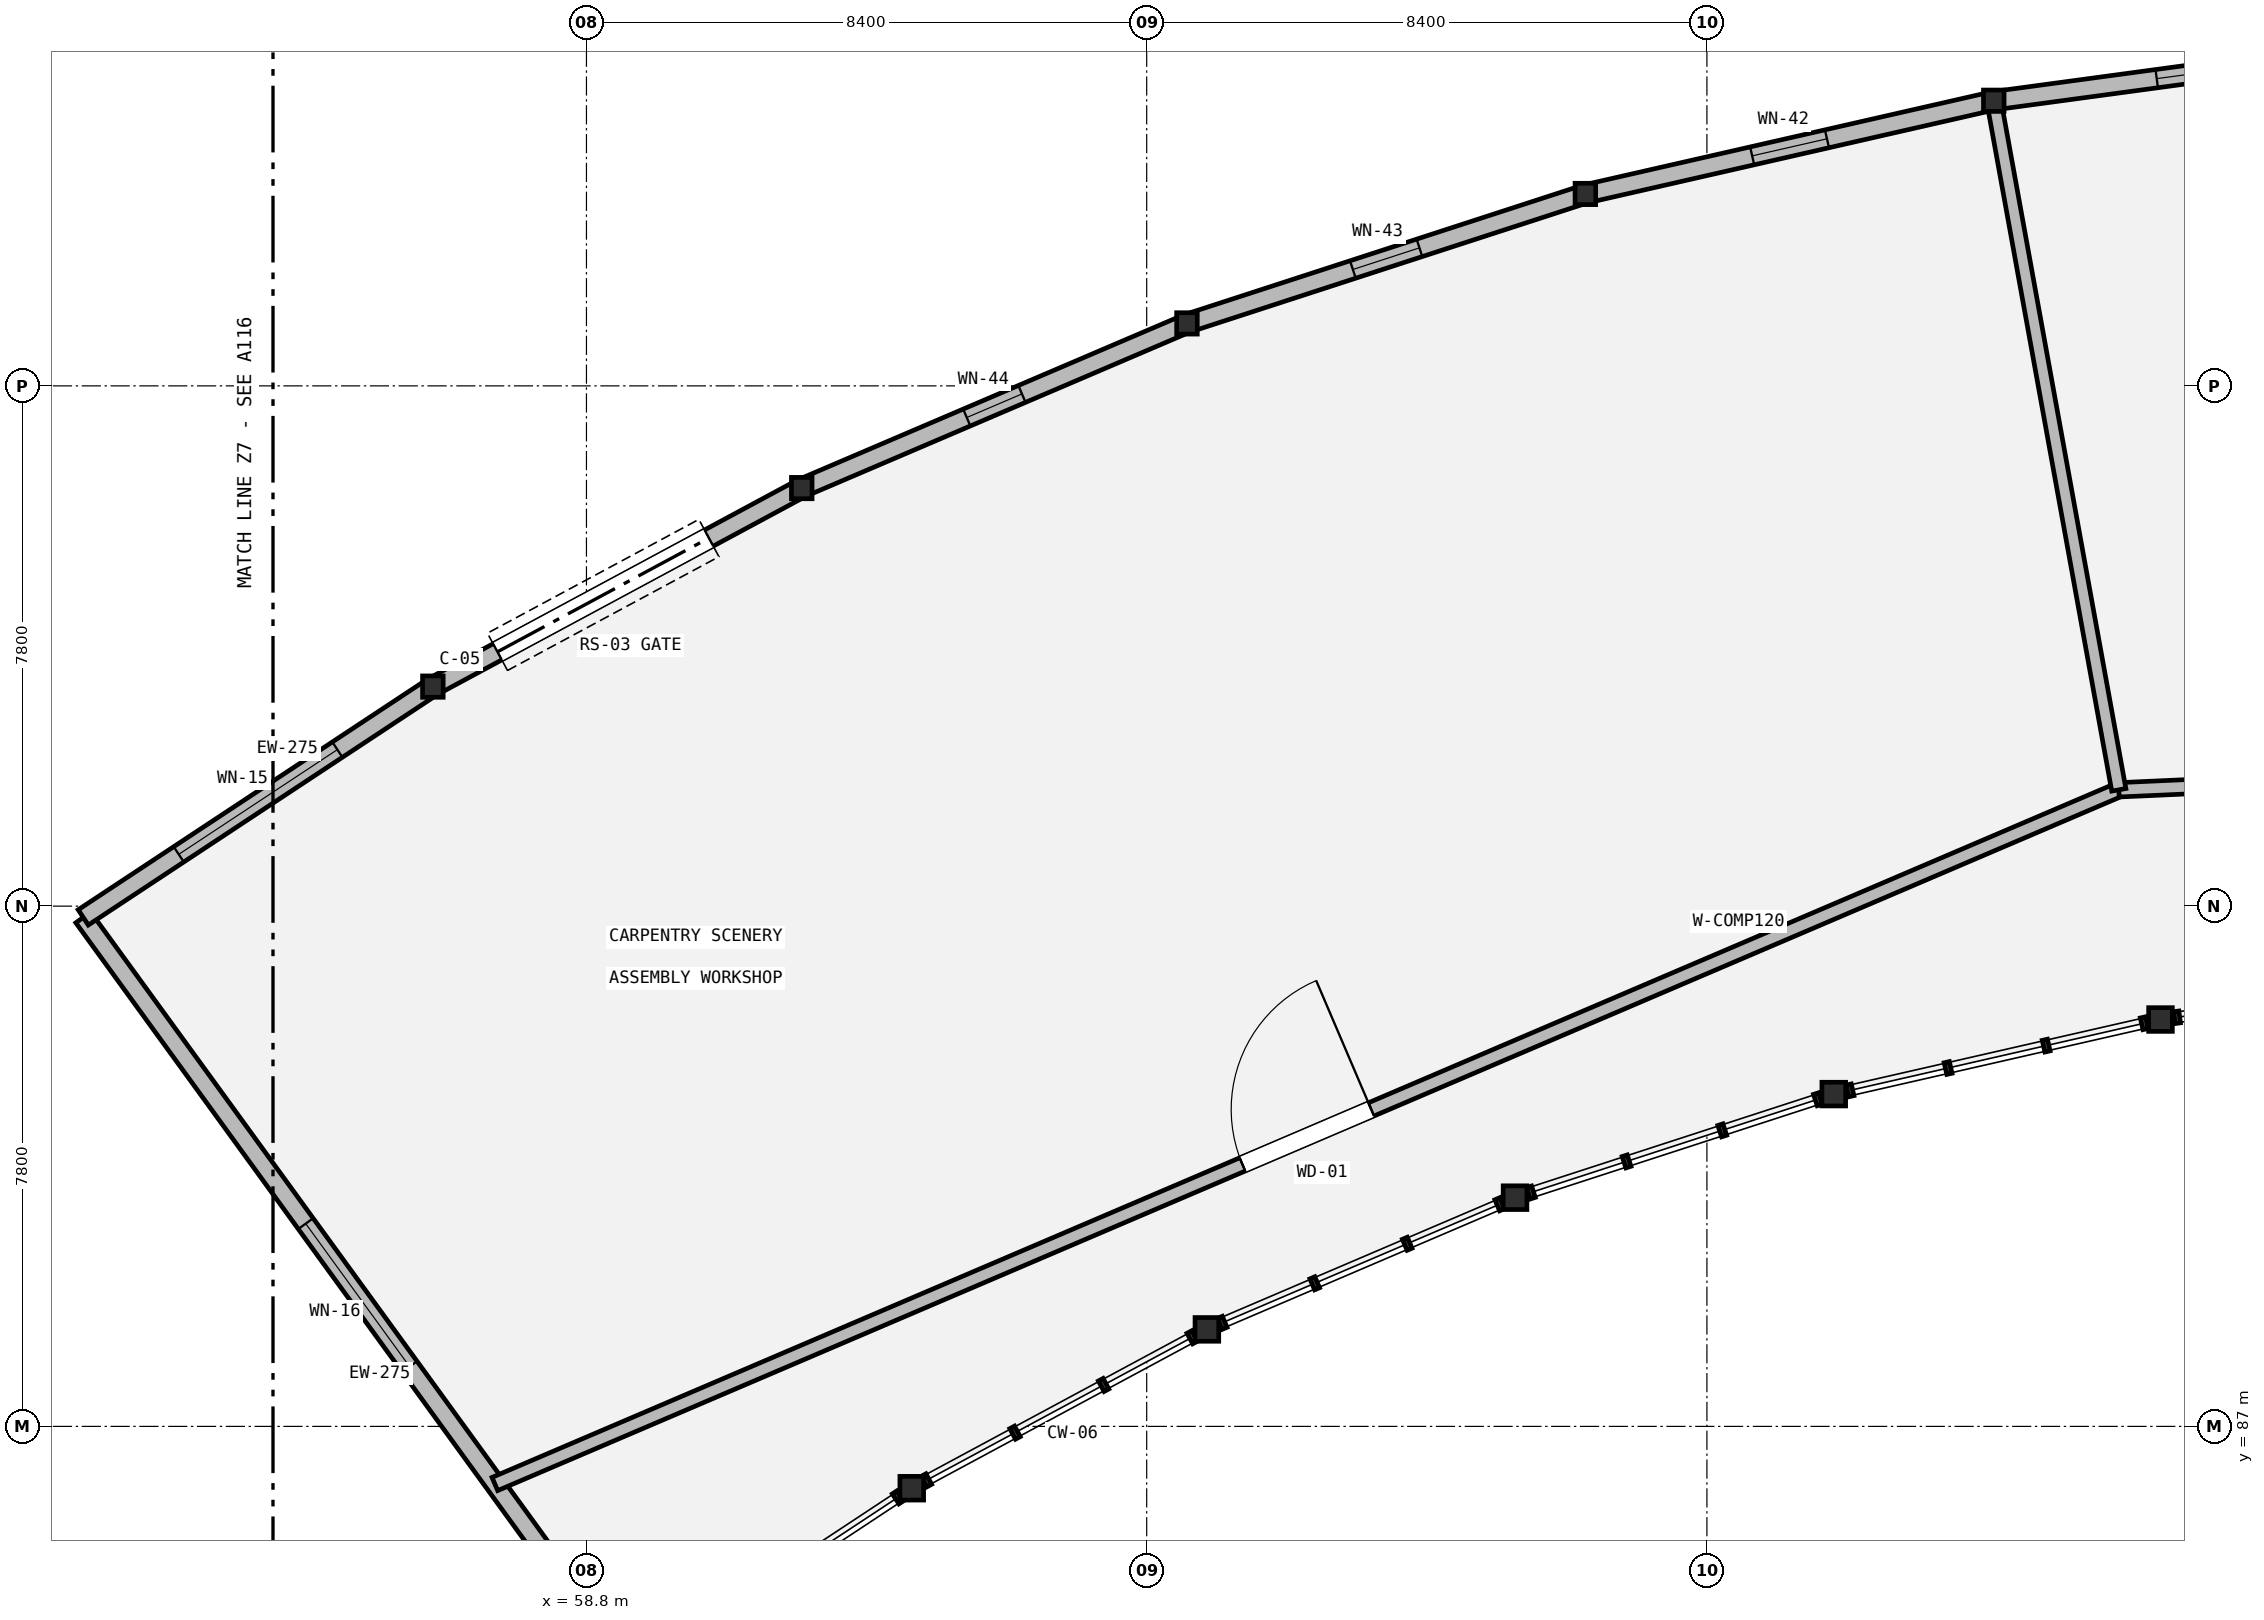
"""IFC4 building model, lengths in metres.
Left out: names, types, materials, properties, quantities, classifications, styles, units other than length and angle.
Written with IfcOpenShell. Run it as: python <this file> out.ifc"""

import sys

from ifc_helpers import new_model, si_unit, direction, frame, frame_2d, origin, origin_2d, place, context, subcontext, project, spatial, rectangle, hollow_circle, i_section, extrude, element, fill, save


model = new_model("IFC4")
c1 = context("Model", 3, precision=1e-05, world=origin(), true_north=direction((0.0, 1.0)))
c2 = subcontext(c1, "Body", "Model", "MODEL_VIEW")
j1 = project(units=[si_unit("LENGTHUNIT", "METRE"), si_unit("PLANEANGLEUNIT", "RADIAN")], contexts=[c1])
p1 = place(None, origin())
s1 = spatial("IfcSite", under=j1, at=p1, CompositionType="ELEMENT")
p2 = place(p1, origin())
s2 = spatial("IfcBuilding", under=s1, at=p2, CompositionType="ELEMENT")
p3 = place(p2, origin())
s3 = spatial("IfcBuildingStorey", under=s2, at=p3, CompositionType="ELEMENT", Elevation=0.0)
p4 = place(p3, frame((51.255, 94.631, 0.0), z_axis=(0.0, 0.0, 1.0), x_axis=(1.0, 0.0, 0.0)))
e1 = element("IfcColumn", 1, at=p4, inside=s3, PredefinedType="COLUMN", context=c2, shape_type="SweptSolid", body=[
    extrude(i_section(OverallWidth=0.309, OverallDepth=0.321, WebThickness=0.014, FlangeThickness=0.022, FilletRadius=0.015, at=origin_2d()), origin(), (0.0, 0.0, 1.0), 5.4),
])
p5 = place(p3, frame((63.677, 86.073, 0.0), z_axis=(0.0, 0.0, 1.0), x_axis=(1.0, 0.0, 0.0)))
e2 = element("IfcColumn", 2, at=p5, inside=s3, PredefinedType="COLUMN", context=c2, shape_type="SweptSolid", body=[
    extrude(hollow_circle(Radius=0.178, WallThickness=0.016, at=origin_2d()), origin(), (0.0, 0.0, 1.0), 5.4),
])
p6 = place(p3, frame((56.497, 98.091, 0.0), z_axis=(0.0, 0.0, 1.0), x_axis=(1.0, 0.0, 0.0)))
e3 = element("IfcColumn", 3, at=p6, inside=s3, PredefinedType="COLUMN", context=c2, shape_type="SweptSolid", body=[
    extrude(i_section(OverallWidth=0.309, OverallDepth=0.321, WebThickness=0.014, FlangeThickness=0.022, FilletRadius=0.015, at=origin_2d()), origin(), (0.0, 0.0, 1.0), 5.4),
])
p7 = place(p3, frame((68.103, 88.454, 0.0), z_axis=(0.0, 0.0, 1.0), x_axis=(1.0, 0.0, 0.0)))
e4 = element("IfcColumn", 4, at=p7, inside=s3, PredefinedType="COLUMN", context=c2, shape_type="SweptSolid", body=[
    extrude(hollow_circle(Radius=0.178, WallThickness=0.016, at=origin_2d()), origin(), (0.0, 0.0, 1.0), 5.4),
])
p8 = place(p3, frame((62.028, 101.068, 0.0), z_axis=(0.0, 0.0, 1.0), x_axis=(1.0, 0.0, 0.0)))
e5 = element("IfcColumn", 5, at=p8, inside=s3, PredefinedType="COLUMN", context=c2, shape_type="SweptSolid", body=[
    extrude(i_section(OverallWidth=0.309, OverallDepth=0.321, WebThickness=0.014, FlangeThickness=0.022, FilletRadius=0.015, at=origin_2d()), origin(), (0.0, 0.0, 1.0), 5.4),
])
p9 = place(p3, frame((72.723, 90.429, 0.0), z_axis=(0.0, 0.0, 1.0), x_axis=(1.0, 0.0, 0.0)))
e6 = element("IfcColumn", 6, at=p9, inside=s3, PredefinedType="COLUMN", context=c2, shape_type="SweptSolid", body=[
    extrude(hollow_circle(Radius=0.178, WallThickness=0.016, at=origin_2d()), origin(), (0.0, 0.0, 1.0), 5.4),
])
p10 = place(p3, frame((67.804, 103.536, 0.0), z_axis=(0.0, 0.0, 1.0), x_axis=(1.0, 0.0, 0.0)))
e7 = element("IfcColumn", 7, at=p10, inside=s3, PredefinedType="COLUMN", context=c2, shape_type="SweptSolid", body=[
    extrude(i_section(OverallWidth=0.309, OverallDepth=0.321, WebThickness=0.014, FlangeThickness=0.022, FilletRadius=0.015, at=origin_2d()), origin(), (0.0, 0.0, 1.0), 5.4),
])
p11 = place(p3, frame((77.502, 91.982, 0.0), z_axis=(0.0, 0.0, 1.0), x_axis=(1.0, 0.0, 0.0)))
e8 = element("IfcColumn", 8, at=p11, inside=s3, PredefinedType="COLUMN", context=c2, shape_type="SweptSolid", body=[
    extrude(hollow_circle(Radius=0.178, WallThickness=0.016, at=origin_2d()), origin(), (0.0, 0.0, 1.0), 5.4),
])
p12 = place(p3, frame((73.777, 105.477, 0.0), z_axis=(0.0, 0.0, 1.0), x_axis=(1.0, 0.0, 0.0)))
e9 = element("IfcColumn", 9, at=p12, inside=s3, PredefinedType="COLUMN", context=c2, shape_type="SweptSolid", body=[
    extrude(i_section(OverallWidth=0.309, OverallDepth=0.321, WebThickness=0.014, FlangeThickness=0.022, FilletRadius=0.015, at=origin_2d()), origin(), (0.0, 0.0, 1.0), 5.4),
])
p13 = place(p3, frame((82.401, 93.1, 0.0), z_axis=(0.0, 0.0, 1.0), x_axis=(1.0, 0.0, 0.0)))
e10 = element("IfcColumn", 10, at=p13, inside=s3, PredefinedType="COLUMN", context=c2, shape_type="SweptSolid", body=[
    extrude(hollow_circle(Radius=0.178, WallThickness=0.016, at=origin_2d()), origin(), (0.0, 0.0, 1.0), 5.4),
])
p14 = place(p3, frame((79.901, 106.875, 0.0), z_axis=(0.0, 0.0, 1.0), x_axis=(1.0, 0.0, 0.0)))
e11 = element("IfcColumn", 11, at=p14, inside=s3, PredefinedType="COLUMN", context=c2, shape_type="SweptSolid", body=[
    extrude(i_section(OverallWidth=0.309, OverallDepth=0.321, WebThickness=0.014, FlangeThickness=0.022, FilletRadius=0.015, at=origin_2d()), origin(), (0.0, 0.0, 1.0), 5.4),
])
p15 = place(p3, frame((59.484, 83.305, 0.0), z_axis=(0.0, 0.0, 1.0), x_axis=(-0.587787980643, 0.809015012105, 0.0)))
e12 = element("IfcWall", 12, at=p15, inside=s3, PredefinedType="STANDARD", context=c2, shape_type="SweptSolid", body=[
    extrude(rectangle(XDim=14.0, YDim=0.275, at=frame_2d((7.0, 0.0))), origin(), (0.0, 0.0, 1.0), 4.639),
])
p16 = place(p15, frame((5.675, 0.0, 0.9)))
e13 = element("IfcOpeningElement", 13, at=p16, cuts=e12, PredefinedType="OPENING", context=c2, shape_type="SweptSolid", body=[
    extrude(rectangle(XDim=2.65, YDim=2.1, at=frame_2d((1.325, 1.05))), frame((0.0, 0.147, 0.0), z_axis=(0.0, -1.0, 0.0), x_axis=(1.0, 0.0, 0.0)), (0.0, 0.0, 1.0), 0.295),
])
p17 = place(p3, frame((51.255, 94.631, 0.0), z_axis=(0.0, 0.0, 1.0), x_axis=(0.834582959038, 0.550882278244, 0.0)))
e14 = element("IfcWall", 14, at=p17, inside=s3, PredefinedType="STANDARD", context=c2, shape_type="SweptSolid", body=[
    extrude(rectangle(XDim=6.281, YDim=0.275, at=frame_2d((3.141, 0.0))), origin(), (0.0, 0.0, 1.0), 4.639),
])
p18 = place(p17, frame((1.716, 0.0, 0.9)))
e15 = element("IfcOpeningElement", 15, at=p18, cuts=e14, PredefinedType="OPENING", context=c2, shape_type="SweptSolid", body=[
    extrude(rectangle(XDim=2.85, YDim=2.1, at=frame_2d((1.425, 1.05))), frame((0.0, 0.147, 0.0), z_axis=(0.0, -1.0, 0.0), x_axis=(1.0, 0.0, 0.0)), (0.0, 0.0, 1.0), 0.295),
])
p19 = place(p3, frame((56.497, 98.091, 0.0), z_axis=(0.0, 0.0, 1.0), x_axis=(0.880582156138, 0.473893517883, 0.0)))
e16 = element("IfcWall", 16, at=p19, inside=s3, PredefinedType="STANDARD", context=c2, shape_type="SweptSolid", body=[
    extrude(rectangle(XDim=6.281, YDim=0.275, at=frame_2d((3.141, 0.0))), origin(), (0.0, 0.0, 1.0), 4.639),
])
p20 = place(p19, frame((1.1, 0.0, 0.0)))
e17 = element("IfcOpeningElement", 17, at=p20, cuts=e16, PredefinedType="OPENING", context=c2, shape_type="SweptSolid", body=[
    extrude(rectangle(XDim=3.6, YDim=3.5, at=frame_2d((1.8, 1.75))), frame((0.0, 0.147, 0.0), z_axis=(0.0, -1.0, 0.0), x_axis=(1.0, 0.0, 0.0)), (0.0, 0.0, 1.0), 0.295),
])
p21 = place(p3, frame((62.028, 101.068, 0.0), z_axis=(0.0, 0.0, 1.0), x_axis=(0.919534614305, 0.393009024189, 0.0)))
e18 = element("IfcWall", 18, at=p21, inside=s3, PredefinedType="STANDARD", context=c2, shape_type="SweptSolid", body=[
    extrude(rectangle(XDim=6.281, YDim=0.275, at=frame_2d((3.141, 0.0))), origin(), (0.0, 0.0, 1.0), 4.639),
])
p22 = place(p21, frame((2.691, 0.0, 0.9)))
e19 = element("IfcOpeningElement", 19, at=p22, cuts=e18, PredefinedType="OPENING", context=c2, shape_type="SweptSolid", body=[
    extrude(rectangle(XDim=0.9, YDim=1.35, at=frame_2d((0.45, 0.675))), frame((0.0, 0.147, 0.0), z_axis=(0.0, -1.0, 0.0), x_axis=(1.0, 0.0, 0.0)), (0.0, 0.0, 1.0), 0.295),
])
p23 = place(p3, frame((67.804, 103.536, 0.0), z_axis=(0.0, 0.0, 1.0), x_axis=(0.951058059905, 0.309012243593, 0.0)))
e20 = element("IfcWall", 20, at=p23, inside=s3, PredefinedType="STANDARD", context=c2, shape_type="SweptSolid", body=[
    extrude(rectangle(XDim=6.281, YDim=0.275, at=frame_2d((3.141, 0.0))), origin(), (0.0, 0.0, 1.0), 4.639),
])
p24 = place(p23, frame((2.615, 0.0, 0.9)))
e21 = element("IfcOpeningElement", 21, at=p24, cuts=e20, PredefinedType="OPENING", context=c2, shape_type="SweptSolid", body=[
    extrude(rectangle(XDim=1.05, YDim=1.35, at=frame_2d((0.525, 0.675))), frame((0.0, 0.147, 0.0), z_axis=(0.0, -1.0, 0.0), x_axis=(1.0, 0.0, 0.0)), (0.0, 0.0, 1.0), 0.295),
])
p25 = place(p3, frame((73.777, 105.477, 0.0), z_axis=(0.0, 0.0, 1.0), x_axis=(0.974926249486, 0.222528218575, 0.0)))
e22 = element("IfcWall", 22, at=p25, inside=s3, PredefinedType="STANDARD", context=c2, shape_type="SweptSolid", body=[
    extrude(rectangle(XDim=6.281, YDim=0.275, at=frame_2d((3.141, 0.0))), origin(), (0.0, 0.0, 1.0), 4.639),
])
p26 = place(p25, frame((2.565, 0.0, 0.9)))
e23 = element("IfcOpeningElement", 23, at=p26, cuts=e22, PredefinedType="OPENING", context=c2, shape_type="SweptSolid", body=[
    extrude(rectangle(XDim=1.15, YDim=1.4, at=frame_2d((0.575, 0.7))), frame((0.0, 0.147, 0.0), z_axis=(0.0, -1.0, 0.0), x_axis=(1.0, 0.0, 0.0)), (0.0, 0.0, 1.0), 0.295),
])
p27 = place(p3, frame((79.901, 106.875, 0.0), z_axis=(0.0, 0.0, 1.0), x_axis=(0.990947344037, 0.134251113014, 0.0)))
e24 = element("IfcWall", 24, at=p27, inside=s3, PredefinedType="STANDARD", context=c2, shape_type="SweptSolid", body=[
    extrude(rectangle(XDim=6.281, YDim=0.275, at=frame_2d((3.141, 0.0))), origin(), (0.0, 0.0, 1.0), 4.639),
])
p28 = place(p27, frame((2.466, 0.0, 0.9)))
e25 = element("IfcOpeningElement", 25, at=p28, cuts=e24, PredefinedType="OPENING", context=c2, shape_type="SweptSolid", body=[
    extrude(rectangle(XDim=1.35, YDim=2.2, at=frame_2d((0.675, 1.1))), frame((0.0, 0.147, 0.0), z_axis=(0.0, -1.0, 0.0), x_axis=(1.0, 0.0, 0.0)), (0.0, 0.0, 1.0), 0.295),
])
p29 = place(p3, frame((57.427, 86.136, 0.0), z_axis=(0.0, 0.0, 1.0), x_axis=(0.919528963336, 0.393022245664, 0.0)))
e26 = element("IfcWall", 26, at=p29, inside=s3, PredefinedType="STANDARD", context=c2, shape_type="SweptSolid", body=[
    extrude(rectangle(XDim=26.48, YDim=0.215, at=frame_2d((13.24, 0.0))), origin(), (0.0, 0.0, 1.0), 4.639),
])
p30 = place(p29, frame((12.19, 0.0, 0.0)))
e27 = element("IfcOpeningElement", 27, at=p30, cuts=e26, PredefinedType="OPENING", context=c2, shape_type="SweptSolid", body=[
    extrude(rectangle(XDim=2.1, YDim=2.5, at=frame_2d((1.05, 1.25))), frame((0.0, 0.117, 0.0), z_axis=(0.0, -1.0, 0.0), x_axis=(1.0, 0.0, 0.0)), (0.0, 0.0, 1.0), 0.235),
])
p31 = place(p3, frame((81.776, 96.544, 0.0), z_axis=(0.0, 0.0, 1.0), x_axis=(0.998992662888, 0.044873817482, 0.0)))
e28 = element("IfcWall", 28, at=p31, inside=s3, PredefinedType="STANDARD", context=c2, shape_type="SweptSolid", body=[
    extrude(rectangle(XDim=15.974, YDim=0.215, at=frame_2d((7.987, 0.0))), origin(), (0.0, 0.0, 1.0), 4.639),
])
p32 = place(p31, frame((6.937, 0.0, 0.0)))
e29 = element("IfcOpeningElement", 29, at=p32, cuts=e28, PredefinedType="OPENING", context=c2, shape_type="SweptSolid", body=[
    extrude(rectangle(XDim=2.1, YDim=2.5, at=frame_2d((1.05, 1.25))), frame((0.0, 0.117, 0.0), z_axis=(0.0, -1.0, 0.0), x_axis=(1.0, 0.0, 0.0)), (0.0, 0.0, 1.0), 0.235),
])
p33 = place(p3, frame((81.776, 96.544, 0.0), z_axis=(0.0, 0.0, 1.0), x_axis=(-0.178570326803, 0.983927150954, 0.0)))
e30 = element("IfcWall", 30, at=p33, inside=s3, PredefinedType="STANDARD", context=c2, shape_type="SweptSolid", body=[
    extrude(rectangle(XDim=10.5, YDim=0.215, at=frame_2d((5.25, 0.0))), origin(), (0.0, 0.0, 1.0), 4.639),
])
p34 = place(p16, origin())
e31 = element("IfcWindow", 31, at=p34, inside=s3, PartitioningType="SINGLE_PANEL", PredefinedType="WINDOW", context=c2, shape_type="SweptSolid", body=[
    extrude(rectangle(XDim=2.65, YDim=2.1, at=frame_2d((1.325, 1.05))), frame((0.0, 0.03, 0.0), z_axis=(0.0, -1.0, 0.0), x_axis=(1.0, 0.0, 0.0)), (0.0, 0.0, 1.0), 0.06),
])
fill(e13, e31)
p35 = place(p18, origin())
e32 = element("IfcWindow", 32, at=p35, inside=s3, PartitioningType="SINGLE_PANEL", PredefinedType="WINDOW", context=c2, shape_type="SweptSolid", body=[
    extrude(rectangle(XDim=2.85, YDim=2.1, at=frame_2d((1.425, 1.05))), frame((0.0, 0.03, 0.0), z_axis=(0.0, -1.0, 0.0), x_axis=(1.0, 0.0, 0.0)), (0.0, 0.0, 1.0), 0.06),
])
fill(e15, e32)
p36 = place(p20, origin())
e33 = element("IfcDoor", 33, at=p36, inside=s3, OperationType="ROLLINGUP", PredefinedType="GATE", context=c2, shape_type="SweptSolid", body=[
    extrude(rectangle(XDim=3.6, YDim=3.5, at=frame_2d((1.8, 1.75))), frame((0.0, 0.025, 0.0), z_axis=(0.0, -1.0, 0.0), x_axis=(1.0, 0.0, 0.0)), (0.0, 0.0, 1.0), 0.05),
])
fill(e17, e33)
p37 = place(p22, origin())
e34 = element("IfcWindow", 34, at=p37, inside=s3, PartitioningType="SINGLE_PANEL", PredefinedType="WINDOW", context=c2, shape_type="SweptSolid", body=[
    extrude(rectangle(XDim=0.9, YDim=1.35, at=frame_2d((0.45, 0.675))), frame((0.0, 0.03, 0.0), z_axis=(0.0, -1.0, 0.0), x_axis=(1.0, 0.0, 0.0)), (0.0, 0.0, 1.0), 0.06),
])
fill(e19, e34)
p38 = place(p24, origin())
e35 = element("IfcWindow", 35, at=p38, inside=s3, PartitioningType="SINGLE_PANEL", PredefinedType="WINDOW", context=c2, shape_type="SweptSolid", body=[
    extrude(rectangle(XDim=1.05, YDim=1.35, at=frame_2d((0.525, 0.675))), frame((0.0, 0.03, 0.0), z_axis=(0.0, -1.0, 0.0), x_axis=(1.0, 0.0, 0.0)), (0.0, 0.0, 1.0), 0.06),
])
fill(e21, e35)
p39 = place(p26, origin())
e36 = element("IfcWindow", 36, at=p39, inside=s3, PartitioningType="SINGLE_PANEL", PredefinedType="WINDOW", context=c2, shape_type="SweptSolid", body=[
    extrude(rectangle(XDim=1.15, YDim=1.4, at=frame_2d((0.575, 0.7))), frame((0.0, 0.03, 0.0), z_axis=(0.0, -1.0, 0.0), x_axis=(1.0, 0.0, 0.0)), (0.0, 0.0, 1.0), 0.06),
])
fill(e23, e36)
p40 = place(p28, origin())
e37 = element("IfcWindow", 37, at=p40, inside=s3, PartitioningType="SINGLE_PANEL", PredefinedType="WINDOW", context=c2, shape_type="SweptSolid", body=[
    extrude(rectangle(XDim=1.35, YDim=2.2, at=frame_2d((0.675, 1.1))), frame((0.0, 0.03, 0.0), z_axis=(0.0, -1.0, 0.0), x_axis=(1.0, 0.0, 0.0)), (0.0, 0.0, 1.0), 0.06),
])
fill(e25, e37)
p41 = place(p30, origin())
e38 = element("IfcDoor", 38, at=p41, inside=s3, OperationType="SINGLE_SWING_RIGHT", PredefinedType="DOOR", context=c2, shape_type="SweptSolid", body=[
    extrude(rectangle(XDim=2.1, YDim=2.5, at=frame_2d((1.05, 1.25))), frame((0.0, 0.025, 0.0), z_axis=(0.0, -1.0, 0.0), x_axis=(1.0, 0.0, 0.0)), (0.0, 0.0, 1.0), 0.05),
])
fill(e27, e38)
save(model, sys.argv[1])
